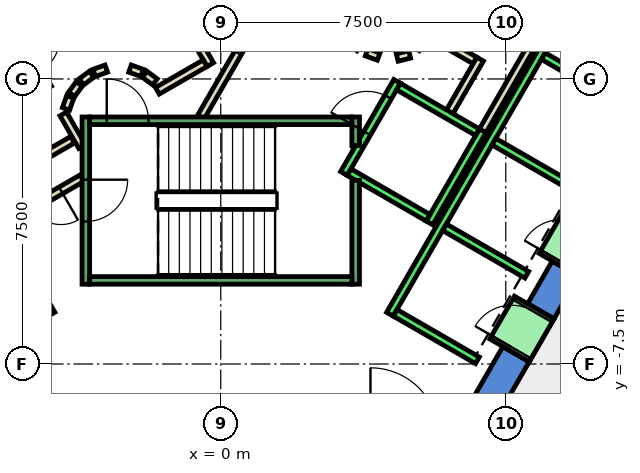
"""IFC4 building model, lengths in metres.
Left out: names, types, materials, properties, quantities, classifications, styles, units other than length and angle.
Written with IfcOpenShell. Run it as: python <this file> out.ifc"""

import sys

from ifc_helpers import new_model, si_unit, direction, frame, frame_2d, origin, place, context, subcontext, project, spatial, polyline, rectangle, outline, extrude, element, fill, save


model = new_model("IFC4")
c1 = context("Model", 3, precision=1e-05, world=origin(), true_north=direction((0.0, 1.0)))
c2 = subcontext(c1, "Body", "Model", "MODEL_VIEW")
j1 = project(units=[si_unit("LENGTHUNIT", "METRE"), si_unit("PLANEANGLEUNIT", "RADIAN")], contexts=[c1])
p1 = place(None, origin())
s1 = spatial("IfcSite", under=j1, at=p1, CompositionType="ELEMENT")
p2 = place(p1, origin())
s2 = spatial("IfcBuilding", under=s1, at=p2, CompositionType="ELEMENT")
p3 = place(p2, frame((0.0, 0.0, 142.4)))
s3 = spatial("IfcBuildingStorey", under=s2, at=p3, CompositionType="ELEMENT", Elevation=142.4)
p4 = place(p3, frame((0.0, 0.0, -0.4)))
e1 = element("IfcWall", 1, at=p4, inside=s3, PredefinedType="SHEAR", context=c2, shape_type="SweptSolid", body=[
    extrude(outline(polyline([(8.117, -7.44), (7.424, -7.04), (6.466, -8.7), (6.928, -9.5), (8.117, -7.44)])), origin(), (0.0, 0.0, 1.0), 4.2),
])
p5 = place(p3, frame((0.0, 0.0, -0.4)))
e2 = element("IfcWall", 2, at=p5, inside=s3, PredefinedType="SHEAR", context=c2, shape_type="SweptSolid", body=[
    extrude(outline(polyline([(9.417, -5.189), (8.724, -4.789), (8.075, -5.914), (8.767, -6.314), (9.417, -5.189)])), origin(), (0.0, 0.0, 1.0), 4.2),
])
p6 = place(p3, frame((0.0, 0.0, 3.6)))
e3 = element("IfcWall", 3, at=p6, inside=s3, PredefinedType="SHEAR", context=c2, shape_type="SweptSolid", body=[
    extrude(outline(polyline([(8.767, -6.314), (8.075, -5.914), (7.424, -7.04), (8.117, -7.44), (8.767, -6.314)])), origin(), (0.0, 0.0, 1.0), 0.2),
])
p7 = place(p3, frame((0.0, 0.0, 3.6)))
e4 = element("IfcWall", 4, at=p7, inside=s3, PredefinedType="SHEAR", context=c2, shape_type="SweptSolid", body=[
    extrude(outline(polyline([(10.067, -4.063), (9.374, -3.663), (8.724, -4.789), (9.417, -5.189), (10.067, -4.063)])), origin(), (0.0, 0.0, 1.0), 0.2),
])
p8 = place(p3, frame((5.499, 1.172, 0.0), z_axis=(0.0, 0.0, 1.0), x_axis=(0.866333505267, -0.499465972466, 0.0)))
e5 = element("IfcWall", 5, at=p8, inside=s3, PredefinedType="PARTITIONING", context=c2, shape_type="SweptSolid", body=[
    extrude(rectangle(XDim=1.374, YDim=0.2, at=frame_2d((0.687, 0.0))), origin(), (0.0, 0.0, 1.0), 3.8),
])
p9 = place(p3, frame((6.826, 0.522, 0.0), z_axis=(0.0, 0.0, 1.0), x_axis=(-0.500016722714, -0.866015748706, 0.0)))
e6 = element("IfcWall", 6, at=p9, inside=s3, PredefinedType="PARTITIONING", context=c2, shape_type="SweptSolid", body=[
    extrude(rectangle(XDim=1.7, YDim=0.2, at=frame_2d((0.85, 0.0))), origin(), (0.0, 0.0, 1.0), 3.8),
])
p10 = place(p3, frame((8.192, 0.888, 0.0), z_axis=(0.0, 0.0, 1.0), x_axis=(-0.499940625693, -0.866059680843, 0.0)))
e7 = element("IfcWall", 7, at=p10, inside=s3, PredefinedType="PARTITIONING", context=c2, shape_type="SweptSolid", body=[
    extrude(rectangle(XDim=2.68, YDim=0.2, at=frame_2d((1.34, 0.0))), origin(), (0.0, 0.0, 1.0), 3.8),
])
p11 = place(p3, frame((-3.9, -1.599, 0.0), z_axis=(0.0, 0.0, 1.0), x_axis=(-0.865969445389, -0.500096910261, 0.0)))
e8 = element("IfcWall", 8, at=p11, inside=s3, PredefinedType="PARTITIONING", context=c2, shape_type="SweptSolid", body=[
    extrude(rectangle(XDim=1.373, YDim=0.2, at=frame_2d((0.687, 0.0))), origin(), (0.0, 0.0, 1.0), 3.8),
])
p12 = place(p3, frame((-3.65, -2.61, 0.0), z_axis=(0.0, 0.0, 1.0), x_axis=(-0.866072462134, -0.499918483688, 0.0)))
e9 = element("IfcWall", 9, at=p12, inside=s3, PredefinedType="PARTITIONING", context=c2, shape_type="SweptSolid", body=[
    extrude(rectangle(XDim=2.084, YDim=0.2, at=frame_2d((1.042, 0.0))), origin(), (0.0, 0.0, 1.0), 3.8),
])
p13 = place(p12, frame((0.642, 0.0, 0.0)))
e10 = element("IfcOpeningElement", 10, at=p13, cuts=e9, PredefinedType="OPENING", context=c2, shape_type="SweptSolid", body=[
    extrude(rectangle(XDim=0.9, YDim=2.1, at=frame_2d((0.45, 1.05))), frame((0.0, 0.11, 0.0), z_axis=(0.0, -1.0, 0.0), x_axis=(1.0, 0.0, 0.0)), (0.0, 0.0, 1.0), 0.22),
])
p14 = place(p3, frame((-4.145, -0.92, 0.0), z_axis=(0.0, 0.0, 1.0), x_axis=(0.499743786207, -0.866173278362, 0.0)))
e11 = element("IfcWall", 11, at=p14, inside=s3, PredefinedType="PARTITIONING", context=c2, shape_type="SweptSolid", body=[
    extrude(rectangle(XDim=0.991, YDim=0.2, at=frame_2d((0.495, 0.0))), origin(), (0.0, 0.0, 1.0), 3.8),
])
p15 = place(p3, frame((-0.52, -1.0, 0.0), z_axis=(0.0, 0.0, 1.0), x_axis=(0.50011622646, 0.865958290007, 0.0)))
e12 = element("IfcWall", 12, at=p15, inside=s3, PredefinedType="PARTITIONING", context=c2, shape_type="SweptSolid", body=[
    extrude(rectangle(XDim=4.991, YDim=0.2, at=frame_2d((2.496, 0.0))), origin(), (0.0, 0.0, 1.0), 3.8),
])
p16 = place(p15, frame((1.945, 0.0, 0.0)))
e13 = element("IfcOpeningElement", 13, at=p16, cuts=e12, PredefinedType="OPENING", context=c2, shape_type="SweptSolid", body=[
    extrude(rectangle(XDim=1.0, YDim=2.1, at=frame_2d((0.5, 1.05))), frame((0.0, 0.11, 0.0), z_axis=(0.0, -1.0, 0.0), x_axis=(1.0, 0.0, 0.0)), (0.0, 0.0, 1.0), 0.22),
])
p17 = place(p3, frame((3.838, 0.702, 0.0), z_axis=(0.0, 0.0, 1.0), x_axis=(0.941035081519, -0.338308993895, 0.0)))
e14 = element("IfcWall", 14, at=p17, inside=s3, PredefinedType="PARTITIONING", context=c2, shape_type="SweptSolid", body=[
    extrude(rectangle(XDim=0.337, YDim=0.2, at=frame_2d((0.168, 0.0))), origin(), (0.0, 0.0, 1.0), 3.8),
])
p18 = place(p3, frame((4.644, 0.564, 0.0), z_axis=(0.0, 0.0, 1.0), x_axis=(0.969929076366, 0.243387729394, 0.0)))
e15 = element("IfcWall", 15, at=p18, inside=s3, PredefinedType="PARTITIONING", context=c2, shape_type="SweptSolid", body=[
    extrude(rectangle(XDim=0.337, YDim=0.2, at=frame_2d((0.168, 0.0))), origin(), (0.0, 0.0, 1.0), 3.8),
])
p19 = place(p3, frame((-2.771, 4.7, 0.0), z_axis=(0.0, 0.0, 1.0), x_axis=(0.499969479948, -0.866043023828, 0.0)))
e16 = element("IfcWall", 16, at=p19, inside=s3, PredefinedType="PARTITIONING", context=c2, shape_type="SweptSolid", body=[
    extrude(rectangle(XDim=4.99, YDim=0.2, at=frame_2d((2.495, 0.0))), origin(), (0.0, 0.0, 1.0), 3.8),
])
p20 = place(p19, frame((1.945, 0.0, 0.0)))
e17 = element("IfcOpeningElement", 17, at=p20, cuts=e16, PredefinedType="OPENING", context=c2, shape_type="SweptSolid", body=[
    extrude(rectangle(XDim=1.0, YDim=2.1, at=frame_2d((0.5, 1.05))), frame((0.0, 0.11, 0.0), z_axis=(0.0, -1.0, 0.0), x_axis=(1.0, 0.0, 0.0)), (0.0, 0.0, 1.0), 0.22),
])
p21 = place(p3, frame((-0.412, 0.414, 0.0), z_axis=(0.0, 0.0, 1.0), x_axis=(-0.866017369001, -0.500013916395, 0.0)))
e18 = element("IfcWall", 18, at=p21, inside=s3, PredefinedType="PARTITIONING", context=c2, shape_type="SweptSolid", body=[
    extrude(rectangle(XDim=1.45, YDim=0.2, at=frame_2d((0.725, 0.0))), origin(), (0.0, 0.0, 1.0), 3.8),
])
p22 = place(p3, frame((-1.731, -0.077, 0.0), z_axis=(0.0, 0.0, 1.0), x_axis=(-0.804311165252, 0.594208338422, 0.0)))
e19 = element("IfcWall", 19, at=p22, inside=s3, PredefinedType="PARTITIONING", context=c2, shape_type="SweptSolid", body=[
    extrude(rectangle(XDim=0.338, YDim=0.2, at=frame_2d((0.169, 0.0))), origin(), (0.0, 0.0, 1.0), 3.8),
])
p23 = place(p3, frame((-2.07, 0.16, 0.0), z_axis=(0.0, 0.0, 1.0), x_axis=(-0.942199461132, 0.335052496547, 0.0)))
e20 = element("IfcWall", 20, at=p23, inside=s3, PredefinedType="PARTITIONING", context=c2, shape_type="SweptSolid", body=[
    extrude(rectangle(XDim=0.337, YDim=0.2, at=frame_2d((0.169, 0.0))), origin(), (0.0, 0.0, 1.0), 3.8),
])
p24 = place(p3, frame((-3.012, 0.273, 0.0), z_axis=(0.0, 0.0, 1.0), x_axis=(-0.942280615813, -0.334824194261, 0.0)))
e21 = element("IfcWall", 21, at=p24, inside=s3, PredefinedType="PARTITIONING", context=c2, shape_type="SweptSolid", body=[
    extrude(rectangle(XDim=0.338, YDim=0.2, at=frame_2d((0.169, 0.0))), origin(), (0.0, 0.0, 1.0), 3.8),
])
p25 = place(p3, frame((-3.397, 0.124, 0.0), z_axis=(0.0, 0.0, 1.0), x_axis=(-0.804311165252, -0.594208338422, 0.0)))
e22 = element("IfcWall", 22, at=p25, inside=s3, PredefinedType="PARTITIONING", context=c2, shape_type="SweptSolid", body=[
    extrude(rectangle(XDim=0.338, YDim=0.2, at=frame_2d((0.169, 0.0))), origin(), (0.0, 0.0, 1.0), 3.8),
])
p26 = place(p3, frame((-3.723, -0.131, 0.0), z_axis=(0.0, 0.0, 1.0), x_axis=(-0.594675113454, -0.803966112121, 0.0)))
e23 = element("IfcWall", 23, at=p26, inside=s3, PredefinedType="PARTITIONING", context=c2, shape_type="SweptSolid", body=[
    extrude(rectangle(XDim=0.338, YDim=0.2, at=frame_2d((0.169, 0.0))), origin(), (0.0, 0.0, 1.0), 3.8),
])
p27 = place(p3, frame((-3.96, -0.47, 0.0), z_axis=(0.0, 0.0, 1.0), x_axis=(-0.334824194261, -0.942280615813, 0.0)))
e24 = element("IfcWall", 24, at=p27, inside=s3, PredefinedType="PARTITIONING", context=c2, shape_type="SweptSolid", body=[
    extrude(rectangle(XDim=0.338, YDim=0.2, at=frame_2d((0.169, 0.0))), origin(), (0.0, 0.0, 1.0), 3.8),
])
p28 = place(p3, frame((12.401, -7.621, 0.0), z_axis=(0.0, 0.0, 1.0), x_axis=(-0.499964151829, -0.866046099747, 0.0)))
e25 = element("IfcWall", 25, at=p28, inside=s3, PredefinedType="PARTITIONING", context=c2, shape_type="SweptSolid", body=[
    extrude(rectangle(XDim=8.656, YDim=0.2, at=frame_2d((4.328, 0.0))), origin(), (0.0, 0.0, 1.0), 3.8),
])
p29 = place(p28, frame((2.694, 0.0, 0.0)))
e26 = element("IfcOpeningElement", 26, at=p29, cuts=e25, PredefinedType="OPENING", context=c2, shape_type="SweptSolid", body=[
    extrude(rectangle(XDim=1.0, YDim=2.1, at=frame_2d((0.5, 1.05))), frame((0.0, 0.11, 0.0), z_axis=(0.0, -1.0, 0.0), x_axis=(1.0, 0.0, 0.0)), (0.0, 0.0, 1.0), 0.22),
])
p30 = place(p28, frame((3.794, 0.0, 0.0)))
e27 = element("IfcOpeningElement", 27, at=p30, cuts=e25, PredefinedType="OPENING", context=c2, shape_type="SweptSolid", body=[
    extrude(rectangle(XDim=1.0, YDim=2.1, at=frame_2d((0.5, 1.05))), frame((0.0, 0.11, 0.0), z_axis=(0.0, -1.0, 0.0), x_axis=(1.0, 0.0, 0.0)), (0.0, 0.0, 1.0), 0.22),
])
p31 = place(p3, frame((-9.751, 2.99, 0.0), z_axis=(0.0, 0.0, 1.0), x_axis=(0.50000090737, -0.866024879913, 0.0)))
e28 = element("IfcWall", 28, at=p31, inside=s3, PredefinedType="STANDARD", context=c2, shape_type="SweptSolid", body=[
    extrude(rectangle(XDim=10.6, YDim=0.2, at=frame_2d((5.3, 0.0))), origin(), (0.0, 0.0, 1.0), 3.8),
])
p32 = place(p3, frame((3.24, -2.488, 0.0), z_axis=(0.0, 0.0, 1.0), x_axis=(0.49994636267, 0.866056369097, 0.0)))
e29 = element("IfcWall", 29, at=p32, inside=s3, PredefinedType="STANDARD", context=c2, shape_type="SweptSolid", body=[
    extrude(rectangle(XDim=2.8, YDim=0.2, at=frame_2d((1.4, 0.0))), origin(), (0.0, 0.0, 1.0), 3.8),
])
p33 = place(p32, frame((1.225, 0.0, 0.0)))
e30 = element("IfcOpeningElement", 30, at=p33, cuts=e29, PredefinedType="OPENING", context=c2, shape_type="SweptSolid", body=[
    extrude(rectangle(XDim=1.1, YDim=2.1, at=frame_2d((0.55, 1.05))), frame((0.0, 0.11, 0.0), z_axis=(0.0, -1.0, 0.0), x_axis=(1.0, 0.0, 0.0)), (0.0, 0.0, 1.0), 0.22),
])
p34 = place(p3, frame((5.492, -3.788, 0.0), z_axis=(0.0, 0.0, 1.0), x_axis=(0.500011755427, 0.866018616679, 0.0)))
e31 = element("IfcWall", 31, at=p34, inside=s3, PredefinedType="STANDARD", context=c2, shape_type="SweptSolid", body=[
    extrude(rectangle(XDim=2.8, YDim=0.2, at=frame_2d((1.4, 0.0))), origin(), (0.0, 0.0, 1.0), 3.8),
])
p35 = place(p3, frame((3.377, -2.452, 0.0), z_axis=(0.0, 0.0, 1.0), x_axis=(0.865955154139, -0.50012165622, 0.0)))
e32 = element("IfcWall", 32, at=p35, inside=s3, PredefinedType="STANDARD", context=c2, shape_type="SweptSolid", body=[
    extrude(rectangle(XDim=2.4, YDim=0.2, at=frame_2d((1.2, 0.0))), origin(), (0.0, 0.0, 1.0), 3.8),
])
p36 = place(p3, frame((4.677, -0.2, 0.0), z_axis=(0.0, 0.0, 1.0), x_axis=(0.865973769406, -0.500089422704, 0.0)))
e33 = element("IfcWall", 33, at=p36, inside=s3, PredefinedType="STANDARD", context=c2, shape_type="SweptSolid", body=[
    extrude(rectangle(XDim=2.399, YDim=0.2, at=frame_2d((1.2, 0.0))), origin(), (0.0, 0.0, 1.0), 3.8),
])
p37 = place(p3, frame((4.451, -6.19, 0.0), z_axis=(0.0, 0.0, 1.0), x_axis=(0.50000090737, 0.866024879913, 0.0)))
e34 = element("IfcWall", 34, at=p37, inside=s3, PredefinedType="STANDARD", context=c2, shape_type="SweptSolid", body=[
    extrude(rectangle(XDim=10.6, YDim=0.2, at=frame_2d((5.3, 0.0))), origin(), (0.0, 0.0, 1.0), 3.8),
])
for number, where, z_axis, x_axis in (
    (35, (4.588, -6.153, 0.0), (0.0, 0.0, 1.0), (0.866, -0.5, 0.0)),
    (36, (5.888, -3.902, 0.0), (0.0, 0.0, 1.0), (0.866, -0.5, 0.0)),
    (37, (7.188, -1.65, 0.0), (0.0, 0.0, 1.0), (0.866, -0.5, 0.0)),
    (38, (8.488, 0.602, 0.0), (0.0, 0.0, 1.0), (0.866, -0.5, 0.0)),
):
    element("IfcWall", number, at=place(p3, frame(where, z_axis=z_axis, x_axis=x_axis)), inside=s3, PredefinedType="STANDARD", context=c2, shape_type="SweptSolid", body=[
        extrude(rectangle(XDim=2.5, YDim=0.2, at=frame_2d((1.25, 0.0))), origin(), (0.0, 0.0, 1.0), 3.8),
    ])
p38 = place(p3, frame((7.598, -7.14, 0.0), z_axis=(0.0, 0.0, 1.0), x_axis=(0.500362116554, 0.865816234728, 0.0)))
e39 = element("IfcWall", 39, at=p38, inside=s3, PredefinedType="STANDARD", context=c2, shape_type="SweptSolid", body=[
    extrude(rectangle(XDim=1.299, YDim=1.2, at=frame_2d((0.65, 0.0))), origin(), (0.0, 0.0, 1.0), 2.4),
])
p39 = place(p38, frame((0.1, 0.0, 0.0)))
e40 = element("IfcOpeningElement", 40, at=p39, cuts=e39, PredefinedType="OPENING", context=c2, shape_type="SweptSolid", body=[
    extrude(rectangle(XDim=1.1, YDim=2.3, at=frame_2d((0.55, 1.15))), frame((0.0, 0.61, 0.0), z_axis=(0.0, -1.0, 0.0), x_axis=(1.0, 0.0, 0.0)), (0.0, 0.0, 1.0), 1.22),
])
p40 = place(p3, frame((8.898, -4.889, 0.0), z_axis=(0.0, 0.0, 1.0), x_axis=(0.500036693733, 0.866004217611, 0.0)))
e41 = element("IfcWall", 41, at=p40, inside=s3, PredefinedType="STANDARD", context=c2, shape_type="SweptSolid", body=[
    extrude(rectangle(XDim=1.3, YDim=1.2, at=frame_2d((0.65, 0.0))), origin(), (0.0, 0.0, 1.0), 2.4),
])
p41 = place(p40, frame((0.1, 0.0, 0.0)))
e42 = element("IfcOpeningElement", 42, at=p41, cuts=e41, PredefinedType="OPENING", context=c2, shape_type="SweptSolid", body=[
    extrude(rectangle(XDim=1.1, YDim=2.3, at=frame_2d((0.55, 1.15))), frame((0.0, 0.61, 0.0), z_axis=(0.0, -1.0, 0.0), x_axis=(1.0, 0.0, 0.0)), (0.0, 0.0, 1.0), 1.22),
])
p42 = place(p3, frame((-3.55, -1.0, 0.0), z_axis=(0.0, 0.0, 1.0), x_axis=(0.0, -1.0, 0.0)))
e43 = element("IfcWall", 43, at=p42, inside=s3, PredefinedType="STANDARD", context=c2, shape_type="SweptSolid", body=[
    extrude(rectangle(XDim=4.4, YDim=0.2, at=frame_2d((2.2, 0.0))), origin(), (0.0, 0.0, 1.0), 3.8),
])
p43 = place(p42, frame((1.65, 0.0, 0.0)))
e44 = element("IfcOpeningElement", 44, at=p43, cuts=e43, PredefinedType="OPENING", context=c2, shape_type="SweptSolid", body=[
    extrude(rectangle(XDim=1.1, YDim=2.2, at=frame_2d((0.55, 1.1))), frame((0.0, 0.11, 0.0), z_axis=(0.0, -1.0, 0.0), x_axis=(1.0, 0.0, 0.0)), (0.0, 0.0, 1.0), 0.22),
])
p44 = place(p3, frame((3.55, -2.667, 0.0), z_axis=(0.0, 0.0, 1.0), x_axis=(0.0, -1.0, 0.0)))
e45 = element("IfcWall", 45, at=p44, inside=s3, PredefinedType="STANDARD", context=c2, shape_type="SweptSolid", body=[
    extrude(rectangle(XDim=2.733, YDim=0.2, at=frame_2d((1.366, 0.0))), origin(), (0.0, 0.0, 1.0), 3.8),
])
p45 = place(p3, frame((3.55, -1.0, 0.0), z_axis=(0.0, 0.0, 1.0), x_axis=(0.0, -1.0, 0.0)))
e46 = element("IfcWall", 46, at=p45, inside=s3, PredefinedType="STANDARD", context=c2, shape_type="SweptSolid", body=[
    extrude(rectangle(XDim=0.751, YDim=0.2, at=frame_2d((0.375, 0.0))), origin(), (0.0, 0.0, 1.0), 3.8),
])
p46 = place(p3, frame((-3.45, -1.1, 0.0), z_axis=(0.0, 0.0, 1.0), x_axis=(1.0, 0.0, 0.0)))
e47 = element("IfcWall", 47, at=p46, inside=s3, PredefinedType="STANDARD", context=c2, shape_type="SweptSolid", body=[
    extrude(rectangle(XDim=6.9, YDim=0.2, at=frame_2d((3.45, 0.0))), origin(), (0.0, 0.0, 1.0), 3.8),
])
p47 = place(p46, frame((0.45, 0.0, 0.0)))
e48 = element("IfcOpeningElement", 48, at=p47, cuts=e47, PredefinedType="OPENING", context=c2, shape_type="SweptSolid", body=[
    extrude(rectangle(XDim=1.1, YDim=2.2, at=frame_2d((0.55, 1.1))), frame((0.0, 0.11, 0.0), z_axis=(0.0, -1.0, 0.0), x_axis=(1.0, 0.0, 0.0)), (0.0, 0.0, 1.0), 0.22),
])
p48 = place(p3, frame((-3.45, -5.3, 0.0), z_axis=(0.0, 0.0, 1.0), x_axis=(1.0, 0.0, 0.0)))
e49 = element("IfcWall", 49, at=p48, inside=s3, PredefinedType="STANDARD", context=c2, shape_type="SweptSolid", body=[
    extrude(rectangle(XDim=6.9, YDim=0.2, at=frame_2d((3.45, 0.0))), origin(), (0.0, 0.0, 1.0), 3.8),
])
p49 = place(p16, origin())
e50 = element("IfcDoor", 50, at=p49, inside=s3, OperationType="SINGLE_SWING_LEFT", PredefinedType="DOOR", context=c2, shape_type="SweptSolid", body=[
    extrude(rectangle(XDim=1.0, YDim=2.1, at=frame_2d((0.5, 1.05))), frame((0.0, 0.025, 0.0), z_axis=(0.0, -1.0, 0.0), x_axis=(1.0, 0.0, 0.0)), (0.0, 0.0, 1.0), 0.05),
])
fill(e13, e50)
p50 = place(p13, origin())
e51 = element("IfcDoor", 51, at=p50, inside=s3, OperationType="SINGLE_SWING_LEFT", PredefinedType="DOOR", context=c2, shape_type="SweptSolid", body=[
    extrude(rectangle(XDim=0.9, YDim=2.1, at=frame_2d((0.45, 1.05))), frame((0.0, 0.025, 0.0), z_axis=(0.0, -1.0, 0.0), x_axis=(1.0, 0.0, 0.0)), (0.0, 0.0, 1.0), 0.05),
])
fill(e10, e51)
p51 = place(p39, origin())
e52 = element("IfcDoor", 52, at=p51, inside=s3, OperationType="SLIDING_TO_LEFT", PredefinedType="DOOR", context=c2, shape_type="SweptSolid", body=[
    extrude(rectangle(XDim=1.1, YDim=2.3, at=frame_2d((0.55, 1.15))), frame((0.0, 0.025, 0.0), z_axis=(0.0, -1.0, 0.0), x_axis=(1.0, 0.0, 0.0)), (0.0, 0.0, 1.0), 0.05),
])
fill(e40, e52)
p52 = place(p33, origin())
e53 = element("IfcDoor", 53, at=p52, inside=s3, OperationType="SLIDING_TO_LEFT", PredefinedType="DOOR", context=c2, shape_type="SweptSolid", body=[
    extrude(rectangle(XDim=1.1, YDim=2.1, at=frame_2d((0.55, 1.05))), frame((0.0, 0.025, 0.0), z_axis=(0.0, -1.0, 0.0), x_axis=(1.0, 0.0, 0.0)), (0.0, 0.0, 1.0), 0.05),
])
fill(e30, e53)
p53 = place(p47, origin())
e54 = element("IfcDoor", 54, at=p53, inside=s3, OperationType="SINGLE_SWING_LEFT", PredefinedType="DOOR", context=c2, shape_type="SweptSolid", body=[
    extrude(rectangle(XDim=1.1, YDim=2.2, at=frame_2d((0.55, 1.1))), frame((0.0, 0.025, 0.0), z_axis=(0.0, -1.0, 0.0), x_axis=(1.0, 0.0, 0.0)), (0.0, 0.0, 1.0), 0.05),
])
fill(e48, e54)
p54 = place(p43, origin())
e55 = element("IfcDoor", 55, at=p54, inside=s3, OperationType="SINGLE_SWING_LEFT", PredefinedType="DOOR", context=c2, shape_type="SweptSolid", body=[
    extrude(rectangle(XDim=1.1, YDim=2.2, at=frame_2d((0.55, 1.1))), frame((0.0, 0.025, 0.0), z_axis=(0.0, -1.0, 0.0), x_axis=(1.0, 0.0, 0.0)), (0.0, 0.0, 1.0), 0.05),
])
fill(e44, e55)
save(model, sys.argv[1])
